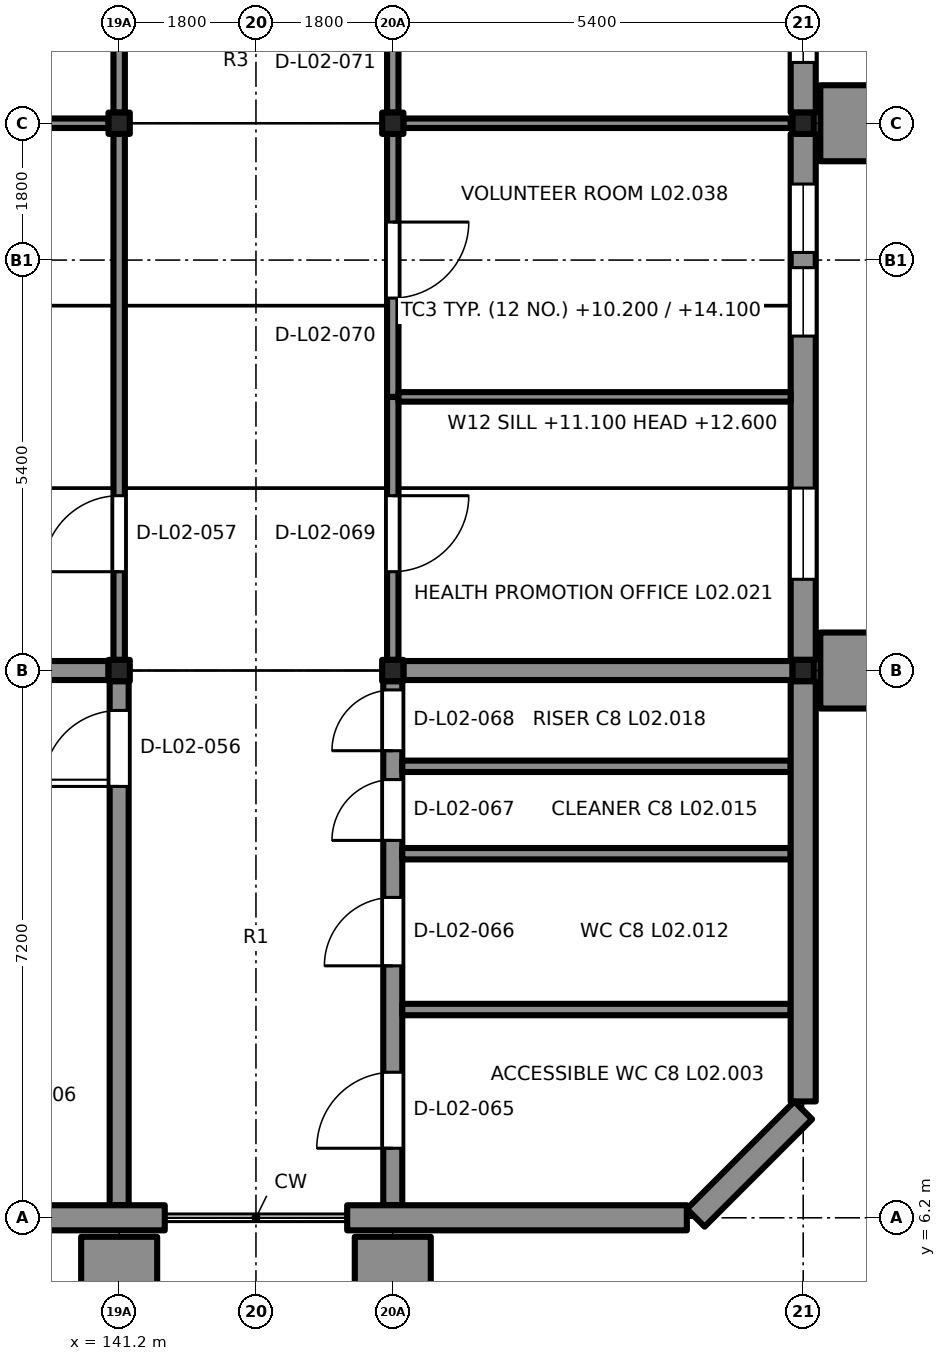
"""IFC4 building model, lengths in metres.
Left out: names, types, materials, properties, quantities, classifications, styles, units other than length and angle.
Written with IfcOpenShell. Run it as: python <this file> out.ifc"""

import sys

from ifc_helpers import new_model, si_unit, direction, frame, frame_2d, origin, origin_2d, place, context, subcontext, project, spatial, rectangle, extrude, element, fill, save


model = new_model("IFC4")
c1 = context("Model", 3, precision=1e-05, world=origin(), true_north=direction((0.0, 1.0)))
c2 = subcontext(c1, "Body", "Model", "MODEL_VIEW")
j1 = project(units=[si_unit("LENGTHUNIT", "METRE"), si_unit("PLANEANGLEUNIT", "RADIAN")], contexts=[c1])
p1 = place(None, origin())
s1 = spatial("IfcSite", under=j1, at=p1, CompositionType="ELEMENT")
p2 = place(p1, origin())
s2 = spatial("IfcBuilding", under=s1, at=p2, CompositionType="ELEMENT")
p3 = place(p2, frame((0.0, 0.0, 10.2)))
s3 = spatial("IfcBuildingStorey", under=s2, at=p3, CompositionType="ELEMENT", Elevation=10.2)
for number, where, z_axis, x_axis in (
    (1, (141.2, 13.4, 0.0), (0.0, 0.0, 1.0), (1.0, 0.0, 0.0)),
    (2, (144.8, 13.4, 0.0), (0.0, 0.0, 1.0), (1.0, 0.0, 0.0)),
    (3, (150.2, 13.4, 0.0), (0.0, 0.0, 1.0), (1.0, 0.0, 0.0)),
    (4, (141.2, 20.6, 0.0), (0.0, 0.0, 1.0), (1.0, 0.0, 0.0)),
    (5, (144.8, 20.6, 0.0), (0.0, 0.0, 1.0), (1.0, 0.0, 0.0)),
    (6, (150.2, 20.6, 0.0), (0.0, 0.0, 1.0), (1.0, 0.0, 0.0)),
):
    element("IfcColumn", number, at=place(p3, frame(where, z_axis=z_axis, x_axis=x_axis)), inside=s3, PredefinedType="COLUMN", context=c2, shape_type="SweptSolid", body=[
        extrude(rectangle(XDim=0.28, YDim=0.28, at=origin_2d()), origin(), (0.0, 0.0, 1.0), 3.9),
    ])
p4 = place(p3, frame((141.2, 6.365, 0.0), z_axis=(0.0, 0.0, 1.0), x_axis=(0.0, 1.0, 0.0)))
e7 = element("IfcWall", 7, at=p4, inside=s3, PredefinedType="SHEAR", context=c2, shape_type="SweptSolid", body=[
    extrude(rectangle(XDim=6.895, YDim=0.25, at=frame_2d((3.448, 0.0))), origin(), (0.0, 0.0, 1.0), 3.2),
])
p5 = place(p4, frame((5.51, 0.0, 0.0)))
e8 = element("IfcOpeningElement", 8, at=p5, cuts=e7, PredefinedType="OPENING", context=c2, shape_type="SweptSolid", body=[
    extrude(rectangle(XDim=1.0, YDim=2.1, at=frame_2d((0.5, 1.05))), frame((0.0, 0.135, 0.0), z_axis=(0.0, -1.0, 0.0), x_axis=(1.0, 0.0, 0.0)), (0.0, 0.0, 1.0), 0.27),
])
p6 = place(p3, frame((135.94, 13.4, 0.0), z_axis=(0.0, 0.0, 1.0), x_axis=(1.0, 0.0, 0.0)))
e9 = element("IfcWall", 9, at=p6, inside=s3, PredefinedType="SHEAR", context=c2, shape_type="SweptSolid", body=[
    extrude(rectangle(XDim=5.12, YDim=0.25, at=frame_2d((2.56, 0.0))), origin(), (0.0, 0.0, 1.0), 3.2),
])
p7 = place(p3, frame((144.8, 6.365, 0.0), z_axis=(0.0, 0.0, 1.0), x_axis=(0.0, 1.0, 0.0)))
e10 = element("IfcWall", 10, at=p7, inside=s3, PredefinedType="SHEAR", context=c2, shape_type="SweptSolid", body=[
    extrude(rectangle(XDim=6.895, YDim=0.25, at=frame_2d((3.448, 0.0))), origin(), (0.0, 0.0, 1.0), 3.2),
])
p8 = place(p7, frame((0.75, 0.0, 0.0)))
e11 = element("IfcOpeningElement", 11, at=p8, cuts=e10, PredefinedType="OPENING", context=c2, shape_type="SweptSolid", body=[
    extrude(rectangle(XDim=1.0, YDim=2.1, at=frame_2d((0.5, 1.05))), frame((0.0, 0.135, 0.0), z_axis=(0.0, -1.0, 0.0), x_axis=(1.0, 0.0, 0.0)), (0.0, 0.0, 1.0), 0.27),
])
p9 = place(p7, frame((3.15, 0.0, 0.0)))
e12 = element("IfcOpeningElement", 12, at=p9, cuts=e10, PredefinedType="OPENING", context=c2, shape_type="SweptSolid", body=[
    extrude(rectangle(XDim=0.9, YDim=2.1, at=frame_2d((0.45, 1.05))), frame((0.0, 0.135, 0.0), z_axis=(0.0, -1.0, 0.0), x_axis=(1.0, 0.0, 0.0)), (0.0, 0.0, 1.0), 0.27),
])
p10 = place(p7, frame((4.8, 0.0, 0.0)))
e13 = element("IfcOpeningElement", 13, at=p10, cuts=e10, PredefinedType="OPENING", context=c2, shape_type="SweptSolid", body=[
    extrude(rectangle(XDim=0.8, YDim=2.1, at=frame_2d((0.4, 1.05))), frame((0.0, 0.135, 0.0), z_axis=(0.0, -1.0, 0.0), x_axis=(1.0, 0.0, 0.0)), (0.0, 0.0, 1.0), 0.27),
])
p11 = place(p7, frame((5.98, 0.0, 0.0)))
e14 = element("IfcOpeningElement", 14, at=p11, cuts=e10, PredefinedType="OPENING", context=c2, shape_type="SweptSolid", body=[
    extrude(rectangle(XDim=0.8, YDim=2.1, at=frame_2d((0.4, 1.05))), frame((0.0, 0.135, 0.0), z_axis=(0.0, -1.0, 0.0), x_axis=(1.0, 0.0, 0.0)), (0.0, 0.0, 1.0), 0.27),
])
p12 = place(p3, frame((144.94, 13.4, 0.0), z_axis=(0.0, 0.0, 1.0), x_axis=(1.0, 0.0, 0.0)))
e15 = element("IfcWall", 15, at=p12, inside=s3, PredefinedType="SHEAR", context=c2, shape_type="SweptSolid", body=[
    extrude(rectangle(XDim=5.12, YDim=0.25, at=frame_2d((2.56, 0.0))), origin(), (0.0, 0.0, 1.0), 3.2),
])
for number, where, z_axis, x_axis in (
    (16, (144.925, 8.94, 0.0), (0.0, 0.0, 1.0), (1.0, 0.0, 0.0)),
    (17, (144.925, 10.99, 0.0), (0.0, 0.0, 1.0), (1.0, 0.0, 0.0)),
    (18, (144.925, 12.14, 0.0), (0.0, 0.0, 1.0), (1.0, 0.0, 0.0)),
):
    element("IfcWall", number, at=place(p3, frame(where, z_axis=z_axis, x_axis=x_axis)), inside=s3, PredefinedType="PARTITIONING", context=c2, shape_type="SweptSolid", body=[
        extrude(rectangle(XDim=5.11, YDim=0.15, at=frame_2d((2.555, 0.0))), origin(), (0.0, 0.0, 1.0), 3.2),
    ])
p13 = place(p3, frame((150.2, 13.26, 0.0), z_axis=(0.0, 0.0, 1.0), x_axis=(0.0, -1.0, 0.0)))
e19 = element("IfcWall", 19, at=p13, inside=s3, PredefinedType="SOLIDWALL", context=c2, shape_type="SweptSolid", body=[
    extrude(rectangle(XDim=5.529, YDim=0.33, at=frame_2d((2.765, 0.0))), origin(), (0.0, 0.0, 1.0), 3.2),
])
p14 = place(p3, frame((150.2, 20.46, 0.0), z_axis=(0.0, 0.0, 1.0), x_axis=(0.0, -1.0, 0.0)))
e20 = element("IfcWall", 20, at=p14, inside=s3, PredefinedType="SOLIDWALL", context=c2, shape_type="SweptSolid", body=[
    extrude(rectangle(XDim=6.92, YDim=0.33, at=frame_2d((3.46, 0.0))), origin(), (0.0, 0.0, 1.0), 3.2),
])
p15 = place(p14, frame((4.66, 0.0, 0.9)))
e21 = element("IfcOpeningElement", 21, at=p15, cuts=e20, PredefinedType="OPENING", context=c2, shape_type="SweptSolid", body=[
    extrude(rectangle(XDim=1.2, YDim=1.5, at=frame_2d((0.6, 0.75))), frame((0.0, 0.175, 0.0), z_axis=(0.0, -1.0, 0.0), x_axis=(1.0, 0.0, 0.0)), (0.0, 0.0, 1.0), 0.35),
])
p16 = place(p14, frame((1.76, 0.0, 0.6)))
e22 = element("IfcOpeningElement", 22, at=p16, cuts=e20, PredefinedType="OPENING", context=c2, shape_type="SweptSolid", body=[
    extrude(rectangle(XDim=0.9, YDim=2.4, at=frame_2d((0.45, 1.2))), frame((0.0, 0.175, 0.0), z_axis=(0.0, -1.0, 0.0), x_axis=(1.0, 0.0, 0.0)), (0.0, 0.0, 1.0), 0.35),
])
p17 = place(p14, frame((0.66, 0.0, 0.6)))
e23 = element("IfcOpeningElement", 23, at=p17, cuts=e20, PredefinedType="OPENING", context=c2, shape_type="SweptSolid", body=[
    extrude(rectangle(XDim=0.9, YDim=2.4, at=frame_2d((0.45, 1.2))), frame((0.0, 0.175, 0.0), z_axis=(0.0, -1.0, 0.0), x_axis=(1.0, 0.0, 0.0)), (0.0, 0.0, 1.0), 0.35),
])
p18 = place(p3, frame((150.2, 27.66, 0.0), z_axis=(0.0, 0.0, 1.0), x_axis=(0.0, -1.0, 0.0)))
e24 = element("IfcWall", 24, at=p18, inside=s3, PredefinedType="SOLIDWALL", context=c2, shape_type="SweptSolid", body=[
    extrude(rectangle(XDim=6.92, YDim=0.33, at=frame_2d((3.46, 0.0))), origin(), (0.0, 0.0, 1.0), 3.2),
])
p19 = place(p18, frame((5.36, 0.0, 0.6)))
e25 = element("IfcOpeningElement", 25, at=p19, cuts=e24, PredefinedType="OPENING", context=c2, shape_type="SweptSolid", body=[
    extrude(rectangle(XDim=0.9, YDim=2.4, at=frame_2d((0.45, 1.2))), frame((0.0, 0.175, 0.0), z_axis=(0.0, -1.0, 0.0), x_axis=(1.0, 0.0, 0.0)), (0.0, 0.0, 1.0), 0.35),
])
p20 = place(p18, frame((4.26, 0.0, 0.6)))
e26 = element("IfcOpeningElement", 26, at=p20, cuts=e24, PredefinedType="OPENING", context=c2, shape_type="SweptSolid", body=[
    extrude(rectangle(XDim=0.9, YDim=2.4, at=frame_2d((0.45, 1.2))), frame((0.0, 0.175, 0.0), z_axis=(0.0, -1.0, 0.0), x_axis=(1.0, 0.0, 0.0)), (0.0, 0.0, 1.0), 0.35),
])
p21 = place(p18, frame((1.76, 0.0, 0.6)))
e27 = element("IfcOpeningElement", 27, at=p21, cuts=e24, PredefinedType="OPENING", context=c2, shape_type="SweptSolid", body=[
    extrude(rectangle(XDim=0.9, YDim=2.4, at=frame_2d((0.45, 1.2))), frame((0.0, 0.175, 0.0), z_axis=(0.0, -1.0, 0.0), x_axis=(1.0, 0.0, 0.0)), (0.0, 0.0, 1.0), 0.35),
])
p22 = place(p18, frame((0.66, 0.0, 0.6)))
e28 = element("IfcOpeningElement", 28, at=p22, cuts=e24, PredefinedType="OPENING", context=c2, shape_type="SweptSolid", body=[
    extrude(rectangle(XDim=0.9, YDim=2.4, at=frame_2d((0.45, 1.2))), frame((0.0, 0.175, 0.0), z_axis=(0.0, -1.0, 0.0), x_axis=(1.0, 0.0, 0.0)), (0.0, 0.0, 1.0), 0.35),
])
for number, where, z_axis, x_axis in (
    (29, (150.8, 13.9, 0.0), (0.0, 0.0, 1.0), (0.0, -1.0, 0.0)),
    (30, (150.8, 21.1, 0.0), (0.0, 0.0, 1.0), (0.0, -1.0, 0.0)),
):
    element("IfcWall", number, at=place(p3, frame(where, z_axis=z_axis, x_axis=x_axis)), inside=s3, PredefinedType="SOLIDWALL", context=c2, shape_type="SweptSolid", body=[
        extrude(rectangle(XDim=1.0, YDim=0.75, at=frame_2d((0.5, 0.0))), origin(), (0.0, 0.0, 1.0), 3.9),
    ])
p23 = place(p3, frame((141.8, 6.2, 0.0), z_axis=(0.0, 0.0, 1.0), x_axis=(-1.0, 0.0, 0.0)))
e31 = element("IfcWall", 31, at=p23, inside=s3, PredefinedType="SOLIDWALL", context=c2, shape_type="SweptSolid", body=[
    extrude(rectangle(XDim=2.68, YDim=0.33, at=frame_2d((1.34, 0.0))), origin(), (0.0, 0.0, 1.0), 3.2),
])
p24 = place(p3, frame((148.669, 6.2, 0.0), z_axis=(0.0, 0.0, 1.0), x_axis=(-1.0, 0.0, 0.0)))
e32 = element("IfcWall", 32, at=p24, inside=s3, PredefinedType="SOLIDWALL", context=c2, shape_type="SweptSolid", body=[
    extrude(rectangle(XDim=4.469, YDim=0.33, at=frame_2d((2.234, 0.0))), origin(), (0.0, 0.0, 1.0), 3.2),
])
for number, where, z_axis, x_axis in (
    (33, (141.7, 5.575, 0.0), (0.0, 0.0, 1.0), (-1.0, 0.0, 0.0)),
    (34, (145.3, 5.575, 0.0), (0.0, 0.0, 1.0), (-1.0, 0.0, 0.0)),
):
    element("IfcWall", number, at=place(p3, frame(where, z_axis=z_axis, x_axis=x_axis)), inside=s3, PredefinedType="SOLIDWALL", context=c2, shape_type="SweptSolid", body=[
        extrude(rectangle(XDim=1.0, YDim=0.75, at=frame_2d((0.5, 0.0))), origin(), (0.0, 0.0, 1.0), 3.9),
    ])
p25 = place(p3, frame((150.2, 7.614, 0.0), z_axis=(0.0, 0.0, 1.0), x_axis=(-0.707106781187, -0.707106781187, 0.0)))
e35 = element("IfcWall", 35, at=p25, inside=s3, PredefinedType="SOLIDWALL", context=c2, shape_type="SweptSolid", body=[
    extrude(rectangle(XDim=2.0, YDim=0.33, at=frame_2d((1.0, 0.0))), origin(), (0.0, 0.0, 1.0), 3.2),
])
p26 = place(p3, frame((141.8, 6.2, 3.6), z_axis=(0.0, 0.0, 1.0), x_axis=(-1.0, 0.0, 0.0)))
e36 = element("IfcWall", 36, at=p26, inside=s3, PredefinedType="SOLIDWALL", context=c2, shape_type="SweptSolid", body=[
    extrude(rectangle(XDim=1.5, YDim=0.33, at=frame_2d((0.75, 0.0))), origin(), (0.0, 0.0, 1.0), 6.45),
])
p27 = place(p3, frame((144.2, 6.2, 3.6), z_axis=(0.0, 0.0, 1.0), x_axis=(-1.0, 0.0, 0.0)))
e37 = element("IfcWall", 37, at=p27, inside=s3, PredefinedType="SOLIDWALL", context=c2, shape_type="SweptSolid", body=[
    extrude(rectangle(XDim=2.4, YDim=0.33, at=frame_2d((1.2, 0.0))), origin(), (0.0, 0.0, 1.0), 7.25),
])
p28 = place(p3, frame((145.7, 6.2, 3.6), z_axis=(0.0, 0.0, 1.0), x_axis=(-1.0, 0.0, 0.0)))
e38 = element("IfcWall", 38, at=p28, inside=s3, PredefinedType="SOLIDWALL", context=c2, shape_type="SweptSolid", body=[
    extrude(rectangle(XDim=1.5, YDim=0.33, at=frame_2d((0.75, 0.0))), origin(), (0.0, 0.0, 1.0), 6.45),
])
p29 = place(p3, frame((147.2, 6.2, 3.6), z_axis=(0.0, 0.0, 1.0), x_axis=(-1.0, 0.0, 0.0)))
e39 = element("IfcWall", 39, at=p29, inside=s3, PredefinedType="SOLIDWALL", context=c2, shape_type="SweptSolid", body=[
    extrude(rectangle(XDim=1.5, YDim=0.33, at=frame_2d((0.75, 0.0))), origin(), (0.0, 0.0, 1.0), 5.4),
])
p30 = place(p3, frame((148.669, 6.2, 3.6), z_axis=(0.0, 0.0, 1.0), x_axis=(-1.0, 0.0, 0.0)))
e40 = element("IfcWall", 40, at=p30, inside=s3, PredefinedType="SOLIDWALL", context=c2, shape_type="SweptSolid", body=[
    extrude(rectangle(XDim=1.469, YDim=0.33, at=frame_2d((0.734, 0.0))), origin(), (0.0, 0.0, 1.0), 4.4),
])
p31 = place(p3, frame((141.2, 13.54, 0.0), z_axis=(0.0, 0.0, 1.0), x_axis=(0.0, 1.0, 0.0)))
e41 = element("IfcWall", 41, at=p31, inside=s3, PredefinedType="PARTITIONING", context=c2, shape_type="SweptSolid", body=[
    extrude(rectangle(XDim=6.92, YDim=0.15, at=frame_2d((3.46, 0.0))), origin(), (0.0, 0.0, 1.0), 4.467),
])
p32 = place(p31, frame((1.16, 0.0, 0.0)))
e42 = element("IfcOpeningElement", 42, at=p32, cuts=e41, PredefinedType="OPENING", context=c2, shape_type="SweptSolid", body=[
    extrude(rectangle(XDim=1.0, YDim=2.1, at=frame_2d((0.5, 1.05))), frame((0.0, 0.085, 0.0), z_axis=(0.0, -1.0, 0.0), x_axis=(1.0, 0.0, 0.0)), (0.0, 0.0, 1.0), 0.17),
])
p33 = place(p3, frame((141.2, 20.74, 0.0), z_axis=(0.0, 0.0, 1.0), x_axis=(0.0, 1.0, 0.0)))
e43 = element("IfcWall", 43, at=p33, inside=s3, PredefinedType="PARTITIONING", context=c2, shape_type="SweptSolid", body=[
    extrude(rectangle(XDim=6.92, YDim=0.15, at=frame_2d((3.46, 0.0))), origin(), (0.0, 0.0, 1.0), 4.467),
])
p34 = place(p33, frame((1.16, 0.0, 0.0)))
e44 = element("IfcOpeningElement", 44, at=p34, cuts=e43, PredefinedType="OPENING", context=c2, shape_type="SweptSolid", body=[
    extrude(rectangle(XDim=1.0, YDim=2.1, at=frame_2d((0.5, 1.05))), frame((0.0, 0.085, 0.0), z_axis=(0.0, -1.0, 0.0), x_axis=(1.0, 0.0, 0.0)), (0.0, 0.0, 1.0), 0.17),
])
p35 = place(p3, frame((135.965, 20.6, 0.0), z_axis=(0.0, 0.0, 1.0), x_axis=(1.0, 0.0, 0.0)))
e45 = element("IfcWall", 45, at=p35, inside=s3, PredefinedType="PARTITIONING", context=c2, shape_type="SweptSolid", body=[
    extrude(rectangle(XDim=5.095, YDim=0.125, at=frame_2d((2.547, 0.0))), origin(), (0.0, 0.0, 1.0), 3.9),
])
p36 = place(p3, frame((144.8, 17.0, 0.0), z_axis=(0.0, 0.0, 1.0), x_axis=(0.0, -1.0, 0.0)))
e46 = element("IfcWall", 46, at=p36, inside=s3, PredefinedType="PARTITIONING", context=c2, shape_type="SweptSolid", body=[
    extrude(rectangle(XDim=3.46, YDim=0.15, at=frame_2d((1.73, 0.0))), origin(), (0.0, 0.0, 1.0), 4.467),
])
p37 = place(p36, frame((1.3, 0.0, 0.0)))
e47 = element("IfcOpeningElement", 47, at=p37, cuts=e46, PredefinedType="OPENING", context=c2, shape_type="SweptSolid", body=[
    extrude(rectangle(XDim=1.0, YDim=2.1, at=frame_2d((0.5, 1.05))), frame((0.0, 0.085, 0.0), z_axis=(0.0, -1.0, 0.0), x_axis=(1.0, 0.0, 0.0)), (0.0, 0.0, 1.0), 0.17),
])
p38 = place(p3, frame((144.8, 20.46, 0.0), z_axis=(0.0, 0.0, 1.0), x_axis=(0.0, -1.0, 0.0)))
e48 = element("IfcWall", 48, at=p38, inside=s3, PredefinedType="PARTITIONING", context=c2, shape_type="SweptSolid", body=[
    extrude(rectangle(XDim=3.46, YDim=0.15, at=frame_2d((1.73, 0.0))), origin(), (0.0, 0.0, 1.0), 4.467),
])
p39 = place(p38, frame((1.16, 0.0, 0.0)))
e49 = element("IfcOpeningElement", 49, at=p39, cuts=e48, PredefinedType="OPENING", context=c2, shape_type="SweptSolid", body=[
    extrude(rectangle(XDim=1.0, YDim=2.1, at=frame_2d((0.5, 1.05))), frame((0.0, 0.085, 0.0), z_axis=(0.0, -1.0, 0.0), x_axis=(1.0, 0.0, 0.0)), (0.0, 0.0, 1.0), 0.17),
])
p40 = place(p3, frame((150.035, 17.0, 0.0), z_axis=(0.0, 0.0, 1.0), x_axis=(-1.0, 0.0, 0.0)))
e50 = element("IfcWall", 50, at=p40, inside=s3, PredefinedType="PARTITIONING", context=c2, shape_type="SweptSolid", body=[
    extrude(rectangle(XDim=5.16, YDim=0.125, at=frame_2d((2.58, 0.0))), origin(), (0.0, 0.0, 1.0), 4.467),
])
p41 = place(p3, frame((144.8, 27.66, 0.0), z_axis=(0.0, 0.0, 1.0), x_axis=(0.0, -1.0, 0.0)))
e51 = element("IfcWall", 51, at=p41, inside=s3, PredefinedType="PARTITIONING", context=c2, shape_type="SweptSolid", body=[
    extrude(rectangle(XDim=6.92, YDim=0.15, at=frame_2d((3.46, 0.0))), origin(), (0.0, 0.0, 1.0), 4.467),
])
p42 = place(p41, frame((4.76, 0.0, 0.0)))
e52 = element("IfcOpeningElement", 52, at=p42, cuts=e51, PredefinedType="OPENING", context=c2, shape_type="SweptSolid", body=[
    extrude(rectangle(XDim=1.0, YDim=2.1, at=frame_2d((0.5, 1.05))), frame((0.0, 0.085, 0.0), z_axis=(0.0, -1.0, 0.0), x_axis=(1.0, 0.0, 0.0)), (0.0, 0.0, 1.0), 0.17),
])
p43 = place(p3, frame((150.035, 20.6, 0.0), z_axis=(0.0, 0.0, 1.0), x_axis=(-1.0, 0.0, 0.0)))
e53 = element("IfcWall", 53, at=p43, inside=s3, PredefinedType="PARTITIONING", context=c2, shape_type="SweptSolid", body=[
    extrude(rectangle(XDim=5.095, YDim=0.125, at=frame_2d((2.547, 0.0))), origin(), (0.0, 0.0, 1.0), 3.9),
])
p44 = place(p5, origin())
e54 = element("IfcDoor", 54, at=p44, inside=s3, OperationType="SINGLE_SWING_RIGHT", PredefinedType="DOOR", context=c2, shape_type="SweptSolid", body=[
    extrude(rectangle(XDim=1.0, YDim=2.1, at=frame_2d((0.5, 1.05))), frame((0.0, 0.025, 0.0), z_axis=(0.0, -1.0, 0.0), x_axis=(1.0, 0.0, 0.0)), (0.0, 0.0, 1.0), 0.05),
])
fill(e8, e54)
p45 = place(p8, origin())
e55 = element("IfcDoor", 55, at=p45, inside=s3, OperationType="SINGLE_SWING_LEFT", PredefinedType="DOOR", context=c2, shape_type="SweptSolid", body=[
    extrude(rectangle(XDim=1.0, YDim=2.1, at=frame_2d((0.5, 1.05))), frame((0.0, 0.025, 0.0), z_axis=(0.0, -1.0, 0.0), x_axis=(1.0, 0.0, 0.0)), (0.0, 0.0, 1.0), 0.05),
])
fill(e11, e55)
p46 = place(p9, origin())
e56 = element("IfcDoor", 56, at=p46, inside=s3, OperationType="SINGLE_SWING_LEFT", PredefinedType="DOOR", context=c2, shape_type="SweptSolid", body=[
    extrude(rectangle(XDim=0.9, YDim=2.1, at=frame_2d((0.45, 1.05))), frame((0.0, 0.025, 0.0), z_axis=(0.0, -1.0, 0.0), x_axis=(1.0, 0.0, 0.0)), (0.0, 0.0, 1.0), 0.05),
])
fill(e12, e56)
p47 = place(p10, origin())
e57 = element("IfcDoor", 57, at=p47, inside=s3, OperationType="SINGLE_SWING_LEFT", PredefinedType="DOOR", context=c2, shape_type="SweptSolid", body=[
    extrude(rectangle(XDim=0.8, YDim=2.1, at=frame_2d((0.4, 1.05))), frame((0.0, 0.025, 0.0), z_axis=(0.0, -1.0, 0.0), x_axis=(1.0, 0.0, 0.0)), (0.0, 0.0, 1.0), 0.05),
])
fill(e13, e57)
p48 = place(p11, origin())
e58 = element("IfcDoor", 58, at=p48, inside=s3, OperationType="SINGLE_SWING_LEFT", PredefinedType="DOOR", context=c2, shape_type="SweptSolid", body=[
    extrude(rectangle(XDim=0.8, YDim=2.1, at=frame_2d((0.4, 1.05))), frame((0.0, 0.025, 0.0), z_axis=(0.0, -1.0, 0.0), x_axis=(1.0, 0.0, 0.0)), (0.0, 0.0, 1.0), 0.05),
])
fill(e14, e58)
p49 = place(p15, origin())
e59 = element("IfcWindow", 59, at=p49, inside=s3, PartitioningType="SINGLE_PANEL", PredefinedType="WINDOW", context=c2, shape_type="SweptSolid", body=[
    extrude(rectangle(XDim=1.2, YDim=1.5, at=frame_2d((0.6, 0.75))), frame((0.0, -0.03, 0.0), z_axis=(0.0, -1.0, 0.0), x_axis=(1.0, 0.0, 0.0)), (0.0, 0.0, 1.0), 0.06),
])
fill(e21, e59)
p50 = place(p16, origin())
e60 = element("IfcWindow", 60, at=p50, inside=s3, PartitioningType="SINGLE_PANEL", PredefinedType="WINDOW", context=c2, shape_type="SweptSolid", body=[
    extrude(rectangle(XDim=0.9, YDim=2.4, at=frame_2d((0.45, 1.2))), frame((0.0, -0.03, 0.0), z_axis=(0.0, -1.0, 0.0), x_axis=(1.0, 0.0, 0.0)), (0.0, 0.0, 1.0), 0.06),
])
fill(e22, e60)
p51 = place(p17, origin())
e61 = element("IfcWindow", 61, at=p51, inside=s3, PartitioningType="SINGLE_PANEL", PredefinedType="WINDOW", context=c2, shape_type="SweptSolid", body=[
    extrude(rectangle(XDim=0.9, YDim=2.4, at=frame_2d((0.45, 1.2))), frame((0.0, -0.03, 0.0), z_axis=(0.0, -1.0, 0.0), x_axis=(1.0, 0.0, 0.0)), (0.0, 0.0, 1.0), 0.06),
])
fill(e23, e61)
p52 = place(p19, origin())
e62 = element("IfcWindow", 62, at=p52, inside=s3, PartitioningType="SINGLE_PANEL", PredefinedType="WINDOW", context=c2, shape_type="SweptSolid", body=[
    extrude(rectangle(XDim=0.9, YDim=2.4, at=frame_2d((0.45, 1.2))), frame((0.0, -0.03, 0.0), z_axis=(0.0, -1.0, 0.0), x_axis=(1.0, 0.0, 0.0)), (0.0, 0.0, 1.0), 0.06),
])
fill(e25, e62)
p53 = place(p32, origin())
e63 = element("IfcDoor", 63, at=p53, inside=s3, OperationType="SINGLE_SWING_LEFT", PredefinedType="DOOR", context=c2, shape_type="SweptSolid", body=[
    extrude(rectangle(XDim=1.0, YDim=2.1, at=frame_2d((0.5, 1.05))), frame((0.0, 0.025, 0.0), z_axis=(0.0, -1.0, 0.0), x_axis=(1.0, 0.0, 0.0)), (0.0, 0.0, 1.0), 0.05),
])
fill(e42, e63)
p54 = place(p37, origin())
e64 = element("IfcDoor", 64, at=p54, inside=s3, OperationType="SINGLE_SWING_RIGHT", PredefinedType="DOOR", context=c2, shape_type="SweptSolid", body=[
    extrude(rectangle(XDim=1.0, YDim=2.1, at=frame_2d((0.5, 1.05))), frame((0.0, 0.025, 0.0), z_axis=(0.0, -1.0, 0.0), x_axis=(1.0, 0.0, 0.0)), (0.0, 0.0, 1.0), 0.05),
])
fill(e47, e64)
p55 = place(p39, origin())
e65 = element("IfcDoor", 65, at=p55, inside=s3, OperationType="SINGLE_SWING_LEFT", PredefinedType="DOOR", context=c2, shape_type="SweptSolid", body=[
    extrude(rectangle(XDim=1.0, YDim=2.1, at=frame_2d((0.5, 1.05))), frame((0.0, 0.025, 0.0), z_axis=(0.0, -1.0, 0.0), x_axis=(1.0, 0.0, 0.0)), (0.0, 0.0, 1.0), 0.05),
])
fill(e49, e65)
save(model, sys.argv[1])
